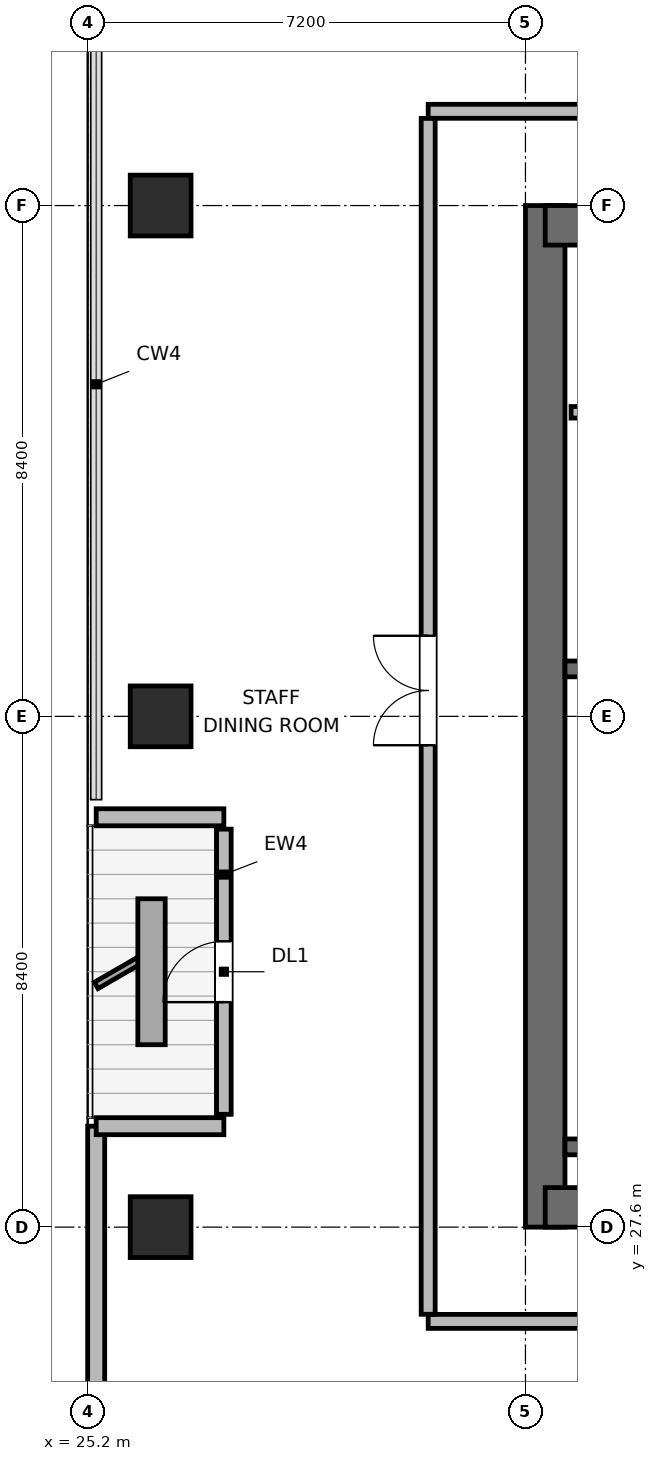
"""IFC4 building model, lengths in metres.
Left out: names, types, materials, properties, quantities, classifications, styles, units other than length and angle.
Written with IfcOpenShell. Run it as: python <this file> out.ifc"""

import sys

from ifc_helpers import new_model, si_unit, direction, frame, frame_2d, origin, origin_2d, place, context, subcontext, project, spatial, rectangle, extrude, element, fill, save


model = new_model("IFC4")
c1 = context("Model", 3, precision=1e-05, world=origin(), true_north=direction((0.0, 1.0)))
c2 = subcontext(c1, "Body", "Model", "MODEL_VIEW")
j1 = project(units=[si_unit("LENGTHUNIT", "METRE"), si_unit("PLANEANGLEUNIT", "RADIAN")], contexts=[c1])
p1 = place(None, origin())
s1 = spatial("IfcSite", under=j1, at=p1, CompositionType="ELEMENT")
p2 = place(p1, origin())
s2 = spatial("IfcBuilding", under=s1, at=p2, CompositionType="ELEMENT")
p3 = place(p2, frame((0.0, 0.0, 255.0)))
s3 = spatial("IfcBuildingStorey", under=s2, at=p3, CompositionType="ELEMENT", Elevation=255.0)
p4 = place(p3, frame((32.725, 27.6, 0.0), z_axis=(0.0, 0.0, 1.0), x_axis=(0.0, 1.0, 0.0)))
e1 = element("IfcWall", 1, at=p4, inside=s3, PredefinedType="SHEAR", context=c2, shape_type="SweptSolid", body=[
    extrude(rectangle(XDim=16.8, YDim=0.65, at=frame_2d((8.4, 0.0))), origin(), (0.0, 0.0, 1.0), 3.9),
])
p5 = place(p3, frame((32.725, 27.925, 0.0), z_axis=(0.0, 0.0, 1.0), x_axis=(1.0, 0.0, 0.0)))
e2 = element("IfcWall", 2, at=p5, inside=s3, PredefinedType="SHEAR", context=c2, shape_type="SweptSolid", body=[
    extrude(rectangle(XDim=9.35, YDim=0.65, at=frame_2d((4.675, 0.0))), origin(), (0.0, 0.0, 1.0), 3.9),
])
p6 = place(p5, frame((5.075, 0.0, 0.0)))
e3 = element("IfcOpeningElement", 3, at=p6, cuts=e2, PredefinedType="OPENING", context=c2, shape_type="SweptSolid", body=[
    extrude(rectangle(XDim=1.05, YDim=2.04, at=frame_2d((0.525, 1.02))), frame((0.0, 0.335, 0.0), z_axis=(0.0, -1.0, 0.0), x_axis=(1.0, 0.0, 0.0)), (0.0, 0.0, 1.0), 0.67),
])
p7 = place(p3, frame((32.725, 44.075, 0.0), z_axis=(0.0, 0.0, 1.0), x_axis=(1.0, 0.0, 0.0)))
e4 = element("IfcWall", 4, at=p7, inside=s3, PredefinedType="SHEAR", context=c2, shape_type="SweptSolid", body=[
    extrude(rectangle(XDim=9.35, YDim=0.65, at=frame_2d((4.675, 0.0))), origin(), (0.0, 0.0, 1.0), 3.9),
])
p8 = place(p7, frame((1.075, 0.0, 0.0)))
e5 = element("IfcOpeningElement", 5, at=p8, cuts=e4, PredefinedType="OPENING", context=c2, shape_type="SweptSolid", body=[
    extrude(rectangle(XDim=0.95, YDim=2.04, at=frame_2d((0.475, 1.02))), frame((0.0, 0.335, 0.0), z_axis=(0.0, -1.0, 0.0), x_axis=(1.0, 0.0, 0.0)), (0.0, 0.0, 1.0), 0.67),
])
p9 = place(p7, frame((4.325, 0.0, 0.0)))
e6 = element("IfcOpeningElement", 6, at=p9, cuts=e4, PredefinedType="OPENING", context=c2, shape_type="SweptSolid", body=[
    extrude(rectangle(XDim=0.9, YDim=2.02, at=frame_2d((0.45, 1.01))), frame((0.0, 0.335, 0.0), z_axis=(0.0, -1.0, 0.0), x_axis=(1.0, 0.0, 0.0)), (0.0, 0.0, 1.0), 0.67),
])
p10 = place(p7, frame((7.225, 0.0, 0.0)))
e7 = element("IfcOpeningElement", 7, at=p10, cuts=e4, PredefinedType="OPENING", context=c2, shape_type="SweptSolid", body=[
    extrude(rectangle(XDim=0.9, YDim=2.02, at=frame_2d((0.45, 1.01))), frame((0.0, 0.335, 0.0), z_axis=(0.0, -1.0, 0.0), x_axis=(1.0, 0.0, 0.0)), (0.0, 0.0, 1.0), 0.67),
])
for number, where, z_axis, x_axis in (
    (8, (33.05, 28.92, 0.0), (0.0, 0.0, 1.0), (1.0, 0.0, 0.0)),
    (9, (33.05, 36.78, 0.0), (0.0, 0.0, 1.0), (1.0, 0.0, 0.0)),
):
    element("IfcWall", number, at=place(p3, frame(where, z_axis=z_axis, x_axis=x_axis)), inside=s3, PredefinedType="SHEAR", context=c2, shape_type="SweptSolid", body=[
        extrude(rectangle(XDim=4.06, YDim=0.26, at=frame_2d((2.03, 0.0))), origin(), (0.0, 0.0, 1.0), 3.9),
    ])
for number, where, z_axis, x_axis in (
    (10, (26.4, 27.6, 0.0), (0.0, 0.0, 1.0), (1.0, 0.0, 0.0)),
    (11, (26.4, 36.0, 0.0), (0.0, 0.0, 1.0), (1.0, 0.0, 0.0)),
    (12, (26.4, 44.4, 0.0), (0.0, 0.0, 1.0), (1.0, 0.0, 0.0)),
):
    element("IfcColumn", number, at=place(p3, frame(where, z_axis=z_axis, x_axis=x_axis)), inside=s3, PredefinedType="COLUMN", context=c2, shape_type="SweptSolid", body=[
        extrude(rectangle(XDim=1.0, YDim=1.0, at=origin_2d()), origin(), (0.0, 0.0, 1.0), 3.9),
    ])
p11 = place(p3, frame((25.34, 23.418, 0.0), z_axis=(0.0, 0.0, 1.0), x_axis=(0.0, 1.0, 0.0)))
e13 = element("IfcWall", 13, at=p11, inside=s3, PredefinedType="SOLIDWALL", context=c2, shape_type="SweptSolid", body=[
    extrude(rectangle(XDim=5.842, YDim=0.28, at=frame_2d((2.921, 0.0))), origin(), (0.0, 0.0, 1.0), 3.68),
])
p12 = place(p3, frame((25.34, 29.26, 0.0), z_axis=(0.0, 0.0, 1.0), x_axis=(1.0, 0.0, 0.0)))
e14 = element("IfcWall", 14, at=p12, inside=s3, PredefinedType="SOLIDWALL", context=c2, shape_type="SweptSolid", body=[
    extrude(rectangle(XDim=2.1, YDim=0.28, at=frame_2d((1.05, 0.0))), origin(), (0.0, 0.0, 1.0), 3.126),
])
p13 = place(p3, frame((27.44, 29.455, 0.0), z_axis=(0.0, 0.0, 1.0), x_axis=(0.0, 1.0, 0.0)))
e15 = element("IfcWall", 15, at=p13, inside=s3, PredefinedType="SOLIDWALL", context=c2, shape_type="SweptSolid", body=[
    extrude(rectangle(XDim=4.69, YDim=0.24, at=frame_2d((2.345, 0.0))), origin(), (0.0, 0.0, 1.0), 3.311),
])
p14 = place(p13, frame((1.845, 0.0, 0.0)))
e16 = element("IfcOpeningElement", 16, at=p14, cuts=e15, PredefinedType="OPENING", context=c2, shape_type="SweptSolid", body=[
    extrude(rectangle(XDim=1.0, YDim=2.02, at=frame_2d((0.5, 1.01))), frame((0.0, 0.13, 0.0), z_axis=(0.0, -1.0, 0.0), x_axis=(1.0, 0.0, 0.0)), (0.0, 0.0, 1.0), 0.26),
])
p15 = place(p3, frame((27.44, 34.34, 0.0), z_axis=(0.0, 0.0, 1.0), x_axis=(-1.0, 0.0, 0.0)))
e17 = element("IfcWall", 17, at=p15, inside=s3, PredefinedType="SOLIDWALL", context=c2, shape_type="SweptSolid", body=[
    extrude(rectangle(XDim=2.1, YDim=0.28, at=frame_2d((1.05, 0.0))), origin(), (0.0, 0.0, 1.0), 3.126),
])
p16 = place(p3, frame((33.15, 41.0, 0.0), z_axis=(0.0, 0.0, 1.0), x_axis=(1.0, 0.0, 0.0)))
e18 = element("IfcWall", 18, at=p16, inside=s3, PredefinedType="PLUMBINGWALL", context=c2, shape_type="SweptSolid", body=[
    extrude(rectangle(XDim=8.5, YDim=0.19, at=frame_2d((4.25, 0.0))), origin(), (0.0, 0.0, 1.0), 3.68),
])
p17 = place(p3, frame((30.8, 26.05, 0.0), z_axis=(0.0, 0.0, 1.0), x_axis=(1.0, 0.0, 0.0)))
e19 = element("IfcWall", 19, at=p17, inside=s3, PredefinedType="PARTITIONING", context=c2, shape_type="SweptSolid", body=[
    extrude(rectangle(XDim=36.0, YDim=0.23, at=frame_2d((18.0, 0.0))), origin(), (0.0, 0.0, 1.0), 3.68),
])
p18 = place(p17, frame((7.875, 0.0, 0.0)))
e20 = element("IfcOpeningElement", 20, at=p18, cuts=e19, PredefinedType="OPENING", context=c2, shape_type="SweptSolid", body=[
    extrude(rectangle(XDim=1.8, YDim=2.06, at=frame_2d((0.9, 1.03))), frame((0.0, 0.125, 0.0), z_axis=(0.0, -1.0, 0.0), x_axis=(1.0, 0.0, 0.0)), (0.0, 0.0, 1.0), 0.25),
])
p19 = place(p17, frame((25.875, 0.0, 0.0)))
e21 = element("IfcOpeningElement", 21, at=p19, cuts=e19, PredefinedType="OPENING", context=c2, shape_type="SweptSolid", body=[
    extrude(rectangle(XDim=1.8, YDim=2.06, at=frame_2d((0.9, 1.03))), frame((0.0, 0.125, 0.0), z_axis=(0.0, -1.0, 0.0), x_axis=(1.0, 0.0, 0.0)), (0.0, 0.0, 1.0), 0.25),
])
p20 = place(p3, frame((30.8, 45.95, 0.0), z_axis=(0.0, 0.0, 1.0), x_axis=(1.0, 0.0, 0.0)))
e22 = element("IfcWall", 22, at=p20, inside=s3, PredefinedType="PARTITIONING", context=c2, shape_type="SweptSolid", body=[
    extrude(rectangle(XDim=36.0, YDim=0.23, at=frame_2d((18.0, 0.0))), origin(), (0.0, 0.0, 1.0), 3.68),
])
p21 = place(p20, frame((3.875, 0.0, 0.0)))
e23 = element("IfcOpeningElement", 23, at=p21, cuts=e22, PredefinedType="OPENING", context=c2, shape_type="SweptSolid", body=[
    extrude(rectangle(XDim=1.8, YDim=2.06, at=frame_2d((0.9, 1.03))), frame((0.0, 0.125, 0.0), z_axis=(0.0, -1.0, 0.0), x_axis=(1.0, 0.0, 0.0)), (0.0, 0.0, 1.0), 0.25),
])
p22 = place(p20, frame((16.225, 0.0, 0.0)))
e24 = element("IfcOpeningElement", 24, at=p22, cuts=e22, PredefinedType="OPENING", context=c2, shape_type="SweptSolid", body=[
    extrude(rectangle(XDim=1.8, YDim=2.06, at=frame_2d((0.9, 1.03))), frame((0.0, 0.125, 0.0), z_axis=(0.0, -1.0, 0.0), x_axis=(1.0, 0.0, 0.0)), (0.0, 0.0, 1.0), 0.25),
])
p23 = place(p20, frame((29.875, 0.0, 0.0)))
e25 = element("IfcOpeningElement", 25, at=p23, cuts=e22, PredefinedType="OPENING", context=c2, shape_type="SweptSolid", body=[
    extrude(rectangle(XDim=1.8, YDim=2.06, at=frame_2d((0.9, 1.03))), frame((0.0, 0.125, 0.0), z_axis=(0.0, -1.0, 0.0), x_axis=(1.0, 0.0, 0.0)), (0.0, 0.0, 1.0), 0.25),
])
p24 = place(p3, frame((30.8, 26.167, 0.0), z_axis=(0.0, 0.0, 1.0), x_axis=(0.0, 1.0, 0.0)))
e26 = element("IfcWall", 26, at=p24, inside=s3, PredefinedType="PARTITIONING", context=c2, shape_type="SweptSolid", body=[
    extrude(rectangle(XDim=19.666, YDim=0.23, at=frame_2d((9.833, 0.0))), origin(), (0.0, 0.0, 1.0), 3.68),
])
p25 = place(p24, frame((9.358, 0.0, 0.0)))
e27 = element("IfcOpeningElement", 27, at=p25, cuts=e26, PredefinedType="OPENING", context=c2, shape_type="SweptSolid", body=[
    extrude(rectangle(XDim=1.8, YDim=2.06, at=frame_2d((0.9, 1.03))), frame((0.0, 0.125, 0.0), z_axis=(0.0, -1.0, 0.0), x_axis=(1.0, 0.0, 0.0)), (0.0, 0.0, 1.0), 0.25),
])
p26 = place(p14, origin())
e28 = element("IfcDoor", 28, at=p26, inside=s3, OperationType="SINGLE_SWING_LEFT", PredefinedType="DOOR", context=c2, shape_type="SweptSolid", body=[
    extrude(rectangle(XDim=1.0, YDim=2.02, at=frame_2d((0.5, 1.01))), frame((0.0, 0.025, 0.0), z_axis=(0.0, -1.0, 0.0), x_axis=(1.0, 0.0, 0.0)), (0.0, 0.0, 1.0), 0.05),
])
fill(e16, e28)
p27 = place(p25, origin())
e29 = element("IfcDoor", 29, at=p27, inside=s3, OperationType="DOUBLE_DOOR_SINGLE_SWING", PredefinedType="DOOR", context=c2, shape_type="SweptSolid", body=[
    extrude(rectangle(XDim=1.8, YDim=2.06, at=frame_2d((0.9, 1.03))), frame((0.0, 0.025, 0.0), z_axis=(0.0, -1.0, 0.0), x_axis=(1.0, 0.0, 0.0)), (0.0, 0.0, 1.0), 0.05),
])
fill(e27, e29)
save(model, sys.argv[1])
